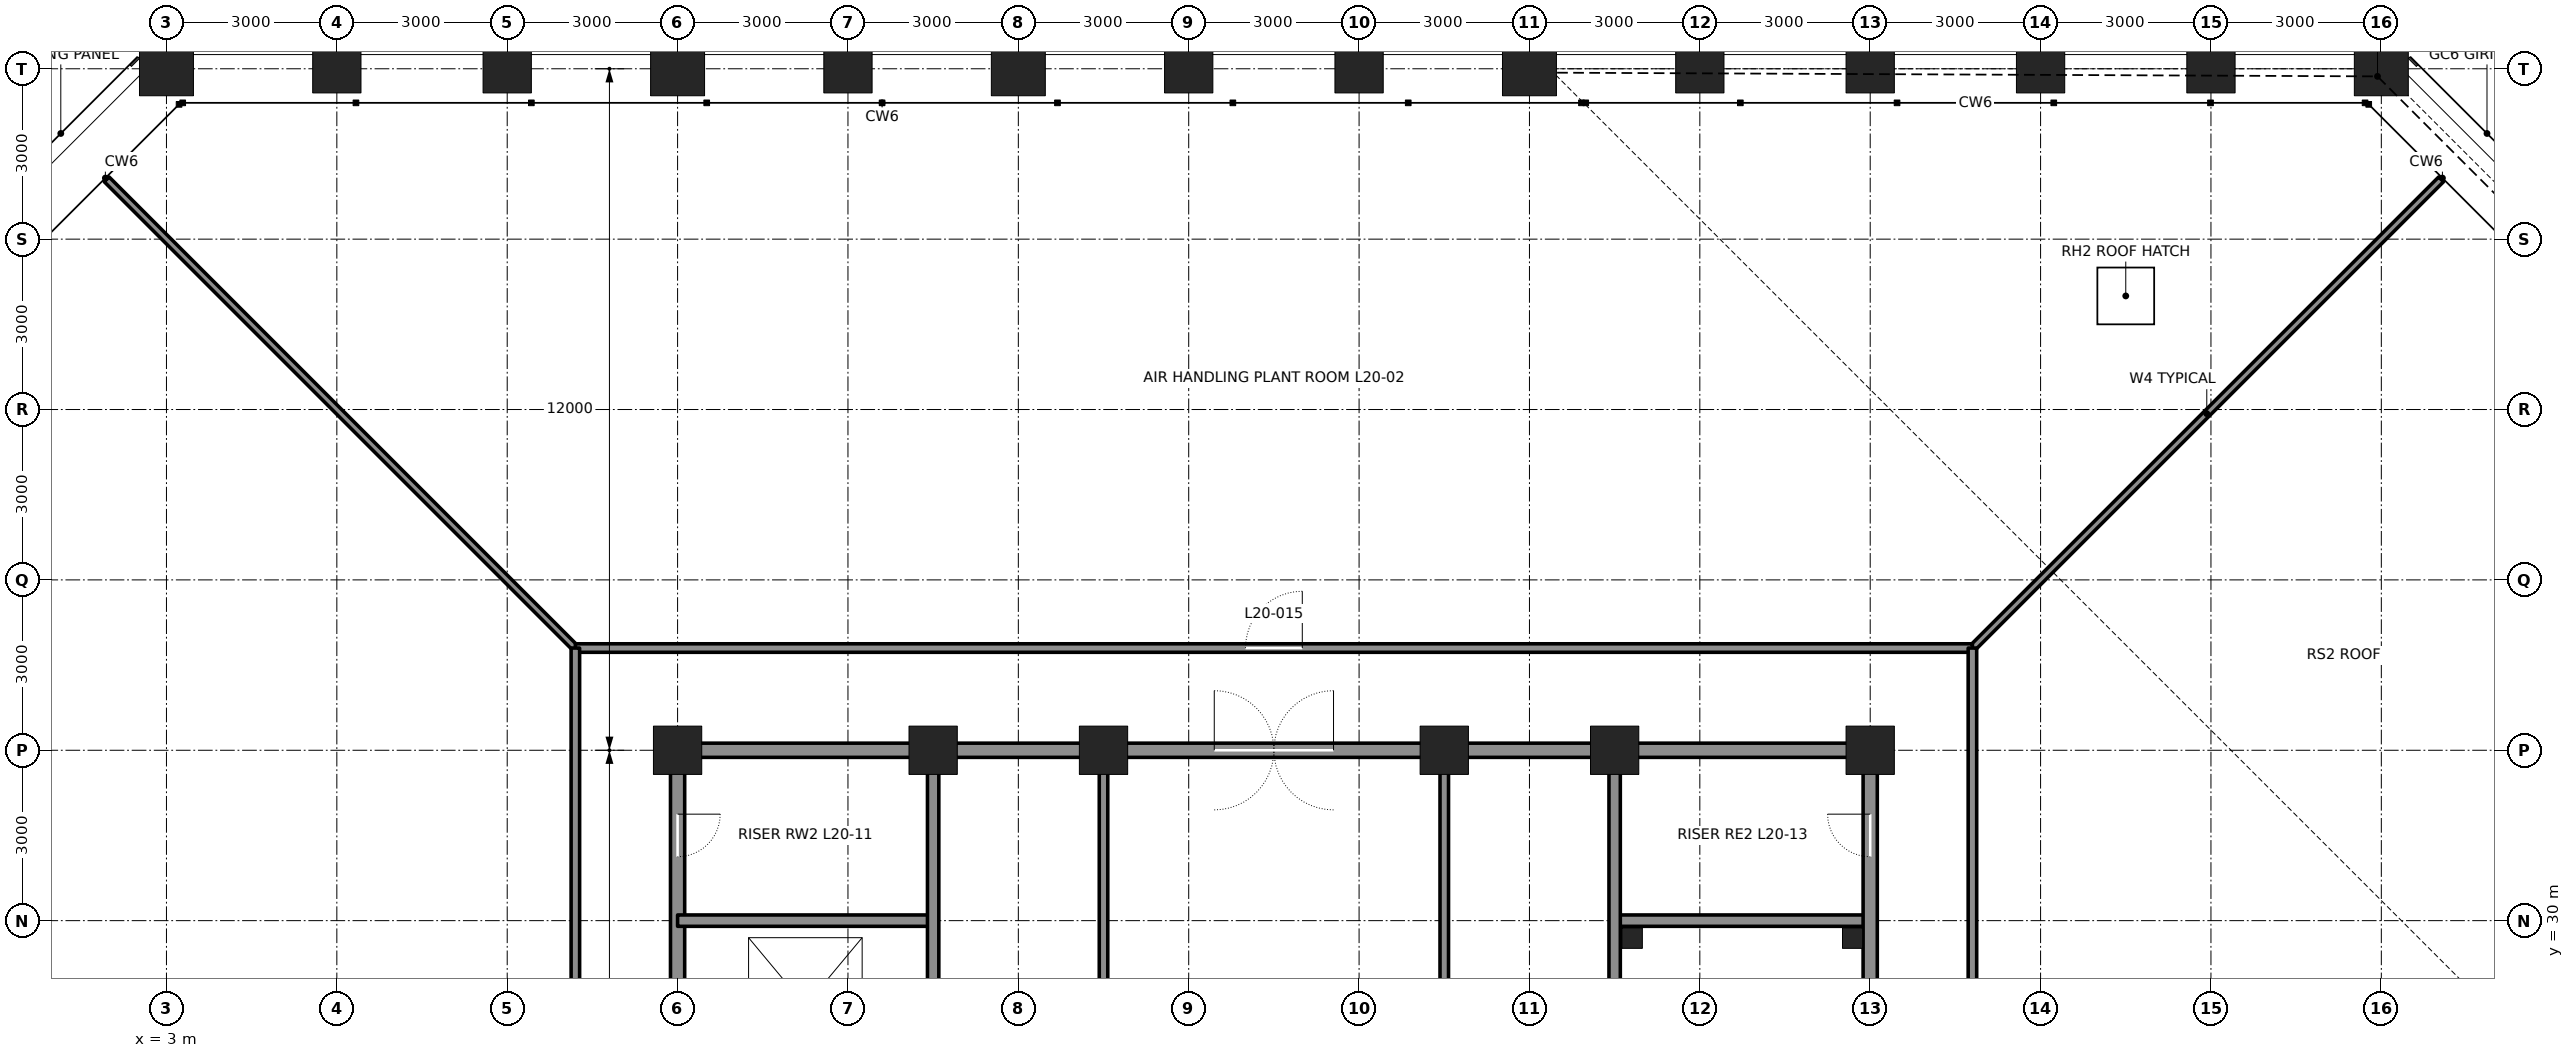
"""IFC4 building model, lengths in metres.
Left out: names, types, materials, properties, quantities, classifications, styles, units other than length and angle.
Written with IfcOpenShell. Run it as: python <this file> out.ifc"""

import sys

from ifc_helpers import new_model, si_unit, direction, frame, frame_2d, origin, origin_2d, place, context, subcontext, project, spatial, rectangle, hollow_rectangle, extrude, element, fill, save


model = new_model("IFC4")
c1 = context("Model", 3, precision=1e-05, world=origin(), true_north=direction((0.0, 1.0)))
c2 = subcontext(c1, "Body", "Model", "MODEL_VIEW")
j1 = project(units=[si_unit("LENGTHUNIT", "METRE"), si_unit("PLANEANGLEUNIT", "RADIAN")], contexts=[c1])
p1 = place(None, origin())
s1 = spatial("IfcSite", under=j1, at=p1, CompositionType="ELEMENT")
p2 = place(p1, origin())
s2 = spatial("IfcBuilding", under=s1, at=p2, CompositionType="ELEMENT")
p3 = place(p2, frame((0.0, 0.0, 96.3)))
s3 = spatial("IfcBuildingStorey", under=s2, at=p3, CompositionType="ELEMENT", Elevation=96.3)
p4 = place(p3, frame((42.0, 45.0, 0.0), z_axis=(0.0, 0.0, 1.0), x_axis=(0.0, 1.0, 0.0)))
e1 = element("IfcColumn", 1, at=p4, inside=s3, PredefinedType="COLUMN", context=c2, shape_type="SweptSolid", body=[
    extrude(hollow_rectangle(XDim=0.95, YDim=0.95, WallThickness=0.095, at=origin_2d()), origin(), (0.0, 0.0, 1.0), 2.345),
])
p5 = place(p3, frame((39.0, 45.0, 0.0), z_axis=(0.0, 0.0, 1.0), x_axis=(0.0, 1.0, 0.0)))
e2 = element("IfcColumn", 2, at=p5, inside=s3, PredefinedType="COLUMN", context=c2, shape_type="SweptSolid", body=[
    extrude(hollow_rectangle(XDim=0.85, YDim=0.85, WallThickness=0.085, at=origin_2d()), origin(), (0.0, 0.0, 1.0), 2.796),
])
p6 = place(p3, frame((36.0, 45.0, 0.0), z_axis=(0.0, 0.0, 1.0), x_axis=(0.0, 1.0, 0.0)))
e3 = element("IfcColumn", 3, at=p6, inside=s3, PredefinedType="COLUMN", context=c2, shape_type="SweptSolid", body=[
    extrude(hollow_rectangle(XDim=0.85, YDim=0.85, WallThickness=0.085, at=origin_2d()), origin(), (0.0, 0.0, 1.0), 3.247),
])
p7 = place(p3, frame((33.0, 45.0, 0.0), z_axis=(0.0, 0.0, 1.0), x_axis=(0.0, 1.0, 0.0)))
e4 = element("IfcColumn", 4, at=p7, inside=s3, PredefinedType="COLUMN", context=c2, shape_type="SweptSolid", body=[
    extrude(hollow_rectangle(XDim=0.85, YDim=0.85, WallThickness=0.085, at=origin_2d()), origin(), (0.0, 0.0, 1.0), 3.698),
])
p8 = place(p3, frame((30.0, 45.0, 0.0), z_axis=(0.0, 0.0, 1.0), x_axis=(0.0, 1.0, 0.0)))
e5 = element("IfcColumn", 5, at=p8, inside=s3, PredefinedType="COLUMN", context=c2, shape_type="SweptSolid", body=[
    extrude(hollow_rectangle(XDim=0.85, YDim=0.85, WallThickness=0.085, at=origin_2d()), origin(), (0.0, 0.0, 1.0), 4.149),
])
p9 = place(p3, frame((27.0, 45.0, 0.0), z_axis=(0.0, 0.0, 1.0), x_axis=(0.0, 1.0, 0.0)))
e6 = element("IfcColumn", 6, at=p9, inside=s3, PredefinedType="COLUMN", context=c2, shape_type="SweptSolid", body=[
    extrude(hollow_rectangle(XDim=0.95, YDim=0.95, WallThickness=0.11, at=origin_2d()), origin(), (0.0, 0.0, 1.0), 6.0),
])
for number, where, z_axis, x_axis in (
    (7, (24.0, 45.0, 0.0), (0.0, 0.0, 1.0), (0.0, 1.0, 0.0)),
    (8, (21.0, 45.0, 0.0), (0.0, 0.0, 1.0), (0.0, 1.0, 0.0)),
):
    element("IfcColumn", number, at=place(p3, frame(where, z_axis=z_axis, x_axis=x_axis)), inside=s3, PredefinedType="COLUMN", context=c2, shape_type="SweptSolid", body=[
        extrude(hollow_rectangle(XDim=0.85, YDim=0.85, WallThickness=0.085, at=origin_2d()), origin(), (0.0, 0.0, 1.0), 6.0),
    ])
p10 = place(p3, frame((18.0, 45.0, 0.0), z_axis=(0.0, 0.0, 1.0), x_axis=(0.0, 1.0, 0.0)))
e9 = element("IfcColumn", 9, at=p10, inside=s3, PredefinedType="COLUMN", context=c2, shape_type="SweptSolid", body=[
    extrude(hollow_rectangle(XDim=0.95, YDim=0.95, WallThickness=0.11, at=origin_2d()), origin(), (0.0, 0.0, 1.0), 6.0),
])
p11 = place(p3, frame((15.0, 45.0, 0.0), z_axis=(0.0, 0.0, 1.0), x_axis=(0.0, 1.0, 0.0)))
e10 = element("IfcColumn", 10, at=p11, inside=s3, PredefinedType="COLUMN", context=c2, shape_type="SweptSolid", body=[
    extrude(hollow_rectangle(XDim=0.85, YDim=0.85, WallThickness=0.085, at=origin_2d()), origin(), (0.0, 0.0, 1.0), 6.0),
])
p12 = place(p3, frame((12.0, 45.0, 0.0), z_axis=(0.0, 0.0, 1.0), x_axis=(0.0, 1.0, 0.0)))
e11 = element("IfcColumn", 11, at=p12, inside=s3, PredefinedType="COLUMN", context=c2, shape_type="SweptSolid", body=[
    extrude(hollow_rectangle(XDim=0.95, YDim=0.95, WallThickness=0.11, at=origin_2d()), origin(), (0.0, 0.0, 1.0), 6.0),
])
for number, where, z_axis, x_axis in (
    (12, (9.0, 45.0, 0.0), (0.0, 0.0, 1.0), (0.0, 1.0, 0.0)),
    (13, (6.0, 45.0, 0.0), (0.0, 0.0, 1.0), (0.0, 1.0, 0.0)),
):
    element("IfcColumn", number, at=place(p3, frame(where, z_axis=z_axis, x_axis=x_axis)), inside=s3, PredefinedType="COLUMN", context=c2, shape_type="SweptSolid", body=[
        extrude(hollow_rectangle(XDim=0.85, YDim=0.85, WallThickness=0.085, at=origin_2d()), origin(), (0.0, 0.0, 1.0), 6.0),
    ])
p13 = place(p3, frame((3.0, 45.0, 0.0), z_axis=(0.0, 0.0, 1.0), x_axis=(0.0, 1.0, 0.0)))
e14 = element("IfcColumn", 14, at=p13, inside=s3, PredefinedType="COLUMN", context=c2, shape_type="SweptSolid", body=[
    extrude(hollow_rectangle(XDim=0.95, YDim=0.95, WallThickness=0.095, at=origin_2d()), origin(), (0.0, 0.0, 1.0), 6.0),
])
for number, where, z_axis, x_axis in (
    (15, (12.0, 33.0, 0.0), (0.0, 0.0, 1.0), (1.0, 0.0, 0.0)),
    (16, (16.5, 33.0, 0.0), (0.0, 0.0, 1.0), (1.0, 0.0, 0.0)),
    (17, (19.5, 33.0, 0.0), (0.0, 0.0, 1.0), (1.0, 0.0, 0.0)),
    (18, (25.5, 33.0, 0.0), (0.0, 0.0, 1.0), (1.0, 0.0, 0.0)),
    (19, (28.5, 33.0, 0.0), (0.0, 0.0, 1.0), (1.0, 0.0, 0.0)),
    (20, (33.0, 33.0, 0.0), (0.0, 0.0, 1.0), (1.0, 0.0, 0.0)),
):
    element("IfcColumn", number, at=place(p3, frame(where, z_axis=z_axis, x_axis=x_axis)), inside=s3, PredefinedType="COLUMN", context=c2, shape_type="SweptSolid", body=[
        extrude(hollow_rectangle(XDim=0.85, YDim=0.85, WallThickness=0.085, at=origin_2d()), origin(), (0.0, 0.0, 1.0), 6.0),
    ])
p14 = place(p3, frame((12.0, 24.25, 0.0), z_axis=(0.0, 0.0, 1.0), x_axis=(0.0, 1.0, 0.0)))
e21 = element("IfcWall", 21, at=p14, inside=s3, PredefinedType="SOLIDWALL", context=c2, shape_type="SweptSolid", body=[
    extrude(rectangle(XDim=8.5, YDim=0.25, at=frame_2d((4.25, 0.0))), origin(), (0.0, 0.0, 1.0), 4.913),
])
p15 = place(p14, frame((0.65, 0.0, 0.0)))
e22 = element("IfcOpeningElement", 22, at=p15, cuts=e21, PredefinedType="OPENING", context=c2, shape_type="SweptSolid", body=[
    extrude(rectangle(XDim=1.2, YDim=2.1, at=frame_2d((0.6, 1.05))), frame((0.0, 0.135, 0.0), z_axis=(0.0, -1.0, 0.0), x_axis=(1.0, 0.0, 0.0)), (0.0, 0.0, 1.0), 0.27),
])
p16 = place(p14, frame((6.875, 0.0, 0.0)))
e23 = element("IfcOpeningElement", 23, at=p16, cuts=e21, PredefinedType="OPENING", context=c2, shape_type="SweptSolid", body=[
    extrude(rectangle(XDim=0.75, YDim=2.1, at=frame_2d((0.375, 1.05))), frame((0.0, 0.135, 0.0), z_axis=(0.0, -1.0, 0.0), x_axis=(1.0, 0.0, 0.0)), (0.0, 0.0, 1.0), 0.27),
])
for number, where, z_axis, x_axis in (
    (24, (12.0, 30.0, 0.0), (0.0, 0.0, 1.0), (1.0, 0.0, 0.0)),
    (25, (28.5, 30.0, 0.0), (0.0, 0.0, 1.0), (1.0, 0.0, 0.0)),
):
    element("IfcWall", number, at=place(p3, frame(where, z_axis=z_axis, x_axis=x_axis)), inside=s3, PredefinedType="SOLIDWALL", context=c2, shape_type="SweptSolid", body=[
        extrude(rectangle(XDim=4.5, YDim=0.2, at=frame_2d((2.25, 0.0))), origin(), (0.0, 0.0, 1.0), 5.84),
    ])
p17 = place(p3, frame((12.25, 33.0, 0.0), z_axis=(0.0, 0.0, 1.0), x_axis=(1.0, 0.0, 0.0)))
e26 = element("IfcWall", 26, at=p17, inside=s3, PredefinedType="SOLIDWALL", context=c2, shape_type="SweptSolid", body=[
    extrude(rectangle(XDim=4.0, YDim=0.25, at=frame_2d((2.0, 0.0))), origin(), (0.0, 0.0, 1.0), 4.981),
])
for number, where, z_axis, x_axis in (
    (27, (16.75, 33.0, 0.0), (0.0, 0.0, 1.0), (1.0, 0.0, 0.0)),
    (28, (25.75, 33.0, 0.0), (0.0, 0.0, 1.0), (1.0, 0.0, 0.0)),
):
    element("IfcWall", number, at=place(p3, frame(where, z_axis=z_axis, x_axis=x_axis)), inside=s3, PredefinedType="SOLIDWALL", context=c2, shape_type="SweptSolid", body=[
        extrude(rectangle(XDim=2.5, YDim=0.25, at=frame_2d((1.25, 0.0))), origin(), (0.0, 0.0, 1.0), 4.981),
    ])
p18 = place(p3, frame((28.75, 33.0, 0.0), z_axis=(0.0, 0.0, 1.0), x_axis=(1.0, 0.0, 0.0)))
e29 = element("IfcWall", 29, at=p18, inside=s3, PredefinedType="SOLIDWALL", context=c2, shape_type="SweptSolid", body=[
    extrude(rectangle(XDim=4.0, YDim=0.25, at=frame_2d((2.0, 0.0))), origin(), (0.0, 0.0, 1.0), 4.981),
])
p19 = place(p3, frame((16.5, 24.25, 0.0), z_axis=(0.0, 0.0, 1.0), x_axis=(0.0, 1.0, 0.0)))
e30 = element("IfcWall", 30, at=p19, inside=s3, PredefinedType="SOLIDWALL", context=c2, shape_type="SweptSolid", body=[
    extrude(rectangle(XDim=8.5, YDim=0.2, at=frame_2d((4.25, 0.0))), origin(), (0.0, 0.0, 1.0), 4.913),
])
for number, where, z_axis, x_axis in (
    (31, (19.5, 27.0, 0.0), (0.0, 0.0, 1.0), (0.0, 1.0, 0.0)),
    (32, (25.5, 27.0, 0.0), (0.0, 0.0, 1.0), (0.0, 1.0, 0.0)),
):
    element("IfcWall", number, at=place(p3, frame(where, z_axis=z_axis, x_axis=x_axis)), inside=s3, PredefinedType="PARTITIONING", context=c2, shape_type="SweptSolid", body=[
        extrude(rectangle(XDim=5.75, YDim=0.15, at=frame_2d((2.875, 0.0))), origin(), (0.0, 0.0, 1.0), 4.865),
    ])
p20 = place(p3, frame((28.5, 24.25, 0.0), z_axis=(0.0, 0.0, 1.0), x_axis=(0.0, 1.0, 0.0)))
e33 = element("IfcWall", 33, at=p20, inside=s3, PredefinedType="SOLIDWALL", context=c2, shape_type="SweptSolid", body=[
    extrude(rectangle(XDim=8.5, YDim=0.2, at=frame_2d((4.25, 0.0))), origin(), (0.0, 0.0, 1.0), 4.913),
])
p21 = place(p3, frame((33.0, 24.25, 0.0), z_axis=(0.0, 0.0, 1.0), x_axis=(0.0, 1.0, 0.0)))
e34 = element("IfcWall", 34, at=p21, inside=s3, PredefinedType="SOLIDWALL", context=c2, shape_type="SweptSolid", body=[
    extrude(rectangle(XDim=8.5, YDim=0.25, at=frame_2d((4.25, 0.0))), origin(), (0.0, 0.0, 1.0), 4.913),
])
p22 = place(p21, frame((6.875, 0.0, 0.0)))
e35 = element("IfcOpeningElement", 35, at=p22, cuts=e34, PredefinedType="OPENING", context=c2, shape_type="SweptSolid", body=[
    extrude(rectangle(XDim=0.75, YDim=2.1, at=frame_2d((0.375, 1.05))), frame((0.0, 0.135, 0.0), z_axis=(0.0, -1.0, 0.0), x_axis=(1.0, 0.0, 0.0)), (0.0, 0.0, 1.0), 0.27),
])
p23 = place(p3, frame((19.5, 33.0, 0.0), z_axis=(0.0, 0.0, 1.0), x_axis=(1.0, 0.0, 0.0)))
e36 = element("IfcWall", 36, at=p23, inside=s3, PredefinedType="SOLIDWALL", context=c2, shape_type="SweptSolid", body=[
    extrude(rectangle(XDim=6.0, YDim=0.25, at=frame_2d((3.0, 0.0))), origin(), (0.0, 0.0, 1.0), 4.981),
])
p24 = place(p23, frame((1.95, 0.0, 0.0)))
e37 = element("IfcOpeningElement", 37, at=p24, cuts=e36, PredefinedType="OPENING", context=c2, shape_type="SweptSolid", body=[
    extrude(rectangle(XDim=2.1, YDim=2.4, at=frame_2d((1.05, 1.2))), frame((0.0, 0.135, 0.0), z_axis=(0.0, -1.0, 0.0), x_axis=(1.0, 0.0, 0.0)), (0.0, 0.0, 1.0), 0.27),
])
for number, where, z_axis, x_axis in (
    (38, (34.8, 34.8, 0.0), (0.0, 0.0, 1.0), (0.707, 0.707, 0.0)),
    (39, (10.2, 34.8, 0.0), (0.0, 0.0, 1.0), (-0.707, 0.707, 0.0)),
):
    element("IfcWall", number, at=place(p3, frame(where, z_axis=z_axis, x_axis=x_axis)), inside=s3, PredefinedType="PARTITIONING", context=c2, shape_type="SweptSolid", body=[
        extrude(rectangle(XDim=11.671, YDim=0.12, at=frame_2d((5.836, 0.0))), origin(), (0.0, 0.0, 1.0), 5.84),
    ])
p25 = place(p3, frame((10.2, 34.8, 0.0), z_axis=(0.0, 0.0, 1.0), x_axis=(1.0, 0.0, 0.0)))
e40 = element("IfcWall", 40, at=p25, inside=s3, PredefinedType="PARTITIONING", context=c2, shape_type="SweptSolid", body=[
    extrude(rectangle(XDim=24.6, YDim=0.15, at=frame_2d((12.3, 0.0))), origin(), (0.0, 0.0, 1.0), 5.84),
])
p26 = place(p25, frame((11.8, 0.0, 0.0)))
e41 = element("IfcOpeningElement", 41, at=p26, cuts=e40, PredefinedType="OPENING", context=c2, shape_type="SweptSolid", body=[
    extrude(rectangle(XDim=1.0, YDim=2.4, at=frame_2d((0.5, 1.2))), frame((0.0, 0.085, 0.0), z_axis=(0.0, -1.0, 0.0), x_axis=(1.0, 0.0, 0.0)), (0.0, 0.0, 1.0), 0.17),
])
p27 = place(p3, frame((10.2, 10.2, 0.0), z_axis=(0.0, 0.0, 1.0), x_axis=(0.0, 1.0, 0.0)))
e42 = element("IfcWall", 42, at=p27, inside=s3, PredefinedType="PARTITIONING", context=c2, shape_type="SweptSolid", body=[
    extrude(rectangle(XDim=24.6, YDim=0.15, at=frame_2d((12.3, 0.0))), origin(), (0.0, 0.0, 1.0), 5.84),
])
p28 = place(p27, frame((11.8, 0.0, 0.0)))
e43 = element("IfcOpeningElement", 43, at=p28, cuts=e42, PredefinedType="OPENING", context=c2, shape_type="SweptSolid", body=[
    extrude(rectangle(XDim=1.0, YDim=2.4, at=frame_2d((0.5, 1.2))), frame((0.0, 0.085, 0.0), z_axis=(0.0, -1.0, 0.0), x_axis=(1.0, 0.0, 0.0)), (0.0, 0.0, 1.0), 0.17),
])
p29 = place(p3, frame((34.8, 10.2, 0.0), z_axis=(0.0, 0.0, 1.0), x_axis=(0.0, 1.0, 0.0)))
e44 = element("IfcWall", 44, at=p29, inside=s3, PredefinedType="PARTITIONING", context=c2, shape_type="SweptSolid", body=[
    extrude(rectangle(XDim=24.6, YDim=0.15, at=frame_2d((12.3, 0.0))), origin(), (0.0, 0.0, 1.0), 5.84),
])
p30 = place(p29, frame((11.8, 0.0, 0.0)))
e45 = element("IfcOpeningElement", 45, at=p30, cuts=e44, PredefinedType="OPENING", context=c2, shape_type="SweptSolid", body=[
    extrude(rectangle(XDim=1.0, YDim=2.4, at=frame_2d((0.5, 1.2))), frame((0.0, 0.085, 0.0), z_axis=(0.0, -1.0, 0.0), x_axis=(1.0, 0.0, 0.0)), (0.0, 0.0, 1.0), 0.17),
])
for number, where, z_axis, x_axis in (
    (46, (28.81, 29.69, 0.0), (0.0, 0.0, 1.0), (1.0, 0.0, 0.0)),
    (47, (32.69, 29.69, 0.0), (0.0, 0.0, 1.0), (1.0, 0.0, 0.0)),
):
    element("IfcColumn", number, at=place(p3, frame(where, z_axis=z_axis, x_axis=x_axis)), inside=s3, PredefinedType="COLUMN", context=c2, shape_type="SweptSolid", body=[
        extrude(hollow_rectangle(XDim=0.356, YDim=0.356, WallThickness=0.015, at=origin_2d()), origin(), (0.0, 0.0, 1.0), 6.0),
    ])
p31 = place(p3, frame((37.5, 41.0, 4.519)))
p32 = place(p31, frame((0.0, 0.0, 0.454)))
e48 = element("IfcDoor", 48, at=p32, inside=s3, OperationType="SINGLE_SWING_LEFT", PredefinedType="TRAPDOOR", context=c2, shape_type="SweptSolid", body=[
    extrude(rectangle(XDim=1.0, YDim=1.0, at=origin_2d()), origin(), (0.0, 0.0, 1.0), 0.05),
])
p33 = place(p24, origin())
e49 = element("IfcDoor", 49, at=p33, inside=s3, OperationType="DOUBLE_DOOR_DOUBLE_SWING", PredefinedType="DOOR", context=c2, shape_type="SweptSolid", body=[
    extrude(rectangle(XDim=2.1, YDim=2.4, at=frame_2d((1.05, 1.2))), frame((0.0, 0.025, 0.0), z_axis=(0.0, -1.0, 0.0), x_axis=(1.0, 0.0, 0.0)), (0.0, 0.0, 1.0), 0.05),
])
fill(e37, e49)
p34 = place(p16, frame((0.75, 0.0, 0.0), z_axis=(0.0, 0.0, 1.0), x_axis=(-1.0, 0.0, 0.0)))
e50 = element("IfcDoor", 50, at=p34, inside=s3, OperationType="SINGLE_SWING_LEFT", PredefinedType="DOOR", context=c2, shape_type="SweptSolid", body=[
    extrude(rectangle(XDim=0.75, YDim=2.1, at=frame_2d((0.375, 1.05))), frame((0.0, 0.025, 0.0), z_axis=(0.0, -1.0, 0.0), x_axis=(1.0, 0.0, 0.0)), (0.0, 0.0, 1.0), 0.05),
])
fill(e23, e50)
p35 = place(p22, origin())
e51 = element("IfcDoor", 51, at=p35, inside=s3, OperationType="SINGLE_SWING_RIGHT", PredefinedType="DOOR", context=c2, shape_type="SweptSolid", body=[
    extrude(rectangle(XDim=0.75, YDim=2.1, at=frame_2d((0.375, 1.05))), frame((0.0, 0.025, 0.0), z_axis=(0.0, -1.0, 0.0), x_axis=(1.0, 0.0, 0.0)), (0.0, 0.0, 1.0), 0.05),
])
fill(e35, e51)
p36 = place(p26, origin())
e52 = element("IfcDoor", 52, at=p36, inside=s3, OperationType="SINGLE_SWING_RIGHT", PredefinedType="DOOR", context=c2, shape_type="SweptSolid", body=[
    extrude(rectangle(XDim=1.0, YDim=2.4, at=frame_2d((0.5, 1.2))), frame((0.0, 0.025, 0.0), z_axis=(0.0, -1.0, 0.0), x_axis=(1.0, 0.0, 0.0)), (0.0, 0.0, 1.0), 0.05),
])
fill(e41, e52)
save(model, sys.argv[1])
